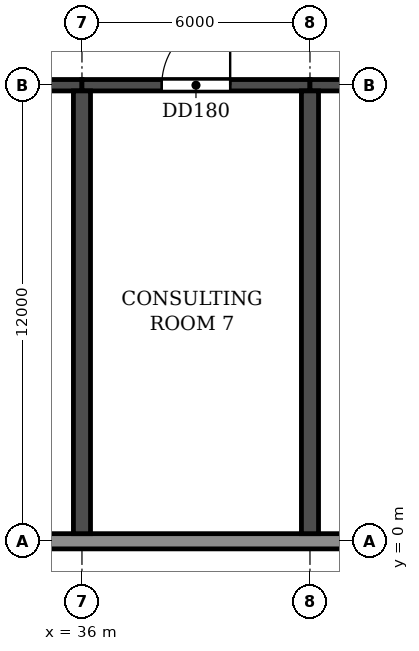
"""IFC4 building model, lengths in metres.
Left out: names, types, materials, properties, quantities, classifications, styles, units other than length and angle.
Written with IfcOpenShell. Run it as: python <this file> out.ifc"""

import sys

from ifc_helpers import new_model, si_unit, direction, frame, frame_2d, origin, place, context, subcontext, project, spatial, rectangle, extrude, element, fill, save


model = new_model("IFC4")
c1 = context("Model", 3, precision=1e-05, world=origin(), true_north=direction((0.0, 1.0)))
c2 = subcontext(c1, "Body", "Model", "MODEL_VIEW")
j1 = project(units=[si_unit("LENGTHUNIT", "METRE"), si_unit("PLANEANGLEUNIT", "RADIAN")], contexts=[c1])
p1 = place(None, origin())
s1 = spatial("IfcSite", under=j1, at=p1, CompositionType="ELEMENT")
p2 = place(p1, origin())
s2 = spatial("IfcBuilding", under=s1, at=p2, CompositionType="ELEMENT")
p3 = place(p2, frame((0.0, 0.0, 6.0)))
s3 = spatial("IfcBuildingStorey", under=s2, at=p3, CompositionType="ELEMENT", Elevation=6.0)
for number, where, z_axis, x_axis in (
    (1, (36.0, 0.2, 0.0), (0.0, 0.0, 1.0), (0.0, 1.0, 0.0)),
    (2, (42.0, 0.2, 0.0), (0.0, 0.0, 1.0), (0.0, 1.0, 0.0)),
):
    element("IfcWall", number, at=place(p3, frame(where, z_axis=z_axis, x_axis=x_axis)), inside=s3, PredefinedType="SHEAR", context=c2, shape_type="SweptSolid", body=[
        extrude(rectangle(XDim=11.65, YDim=0.45, at=frame_2d((5.825, 0.0))), origin(), (0.0, 0.0, 1.0), 4.52),
    ])
p4 = place(p3, frame((30.0, 12.0, 0.0), z_axis=(0.0, 0.0, 1.0), x_axis=(1.0, 0.0, 0.0)))
e3 = element("IfcWall", 3, at=p4, inside=s3, PredefinedType="SHEAR", context=c2, shape_type="SweptSolid", body=[
    extrude(rectangle(XDim=6.0, YDim=0.3, at=frame_2d((3.0, 0.0))), origin(), (0.0, 0.0, 1.0), 3.92),
])
p5 = place(p4, frame((2.1, 0.0, 0.0)))
e4 = element("IfcOpeningElement", 4, at=p5, cuts=e3, PredefinedType="OPENING", context=c2, shape_type="SweptSolid", body=[
    extrude(rectangle(XDim=1.8, YDim=2.1, at=frame_2d((0.9, 1.05))), frame((0.0, 0.16, 0.0), z_axis=(0.0, -1.0, 0.0), x_axis=(1.0, 0.0, 0.0)), (0.0, 0.0, 1.0), 0.32),
])
p6 = place(p3, frame((36.0, 12.0, 0.0), z_axis=(0.0, 0.0, 1.0), x_axis=(1.0, 0.0, 0.0)))
e5 = element("IfcWall", 5, at=p6, inside=s3, PredefinedType="SHEAR", context=c2, shape_type="SweptSolid", body=[
    extrude(rectangle(XDim=6.0, YDim=0.3, at=frame_2d((3.0, 0.0))), origin(), (0.0, 0.0, 1.0), 3.92),
])
p7 = place(p6, frame((2.1, 0.0, 0.0)))
e6 = element("IfcOpeningElement", 6, at=p7, cuts=e5, PredefinedType="OPENING", context=c2, shape_type="SweptSolid", body=[
    extrude(rectangle(XDim=1.8, YDim=2.1, at=frame_2d((0.9, 1.05))), frame((0.0, 0.16, 0.0), z_axis=(0.0, -1.0, 0.0), x_axis=(1.0, 0.0, 0.0)), (0.0, 0.0, 1.0), 0.32),
])
p8 = place(p3, frame((42.0, 12.0, 0.0), z_axis=(0.0, 0.0, 1.0), x_axis=(1.0, 0.0, 0.0)))
e7 = element("IfcWall", 7, at=p8, inside=s3, PredefinedType="SHEAR", context=c2, shape_type="SweptSolid", body=[
    extrude(rectangle(XDim=6.0, YDim=0.3, at=frame_2d((3.0, 0.0))), origin(), (0.0, 0.0, 1.0), 3.92),
])
p9 = place(p8, frame((2.1, 0.0, 0.0)))
e8 = element("IfcOpeningElement", 8, at=p9, cuts=e7, PredefinedType="OPENING", context=c2, shape_type="SweptSolid", body=[
    extrude(rectangle(XDim=1.8, YDim=2.1, at=frame_2d((0.9, 1.05))), frame((0.0, 0.16, 0.0), z_axis=(0.0, -1.0, 0.0), x_axis=(1.0, 0.0, 0.0)), (0.0, 0.0, 1.0), 0.32),
])
p10 = place(p3, frame((-3.0, 0.0, 0.0), z_axis=(0.0, 0.0, 1.0), x_axis=(1.0, 0.0, 0.0)))
e9 = element("IfcWall", 9, at=p10, inside=s3, PredefinedType="STANDARD", context=c2, shape_type="SweptSolid", body=[
    extrude(rectangle(XDim=108.0, YDim=0.4, at=frame_2d((54.0, 0.0))), origin(), (0.0, 0.0, 1.0), 4.52),
])
p11 = place(p7, origin())
e10 = element("IfcDoor", 10, at=p11, inside=s3, OperationType="DOUBLE_DOOR_SINGLE_SWING", PredefinedType="DOOR", context=c2, shape_type="SweptSolid", body=[
    extrude(rectangle(XDim=1.8, YDim=2.1, at=frame_2d((0.9, 1.05))), frame((0.0, 0.025, 0.0), z_axis=(0.0, -1.0, 0.0), x_axis=(1.0, 0.0, 0.0)), (0.0, 0.0, 1.0), 0.05),
])
fill(e6, e10)
save(model, sys.argv[1])
